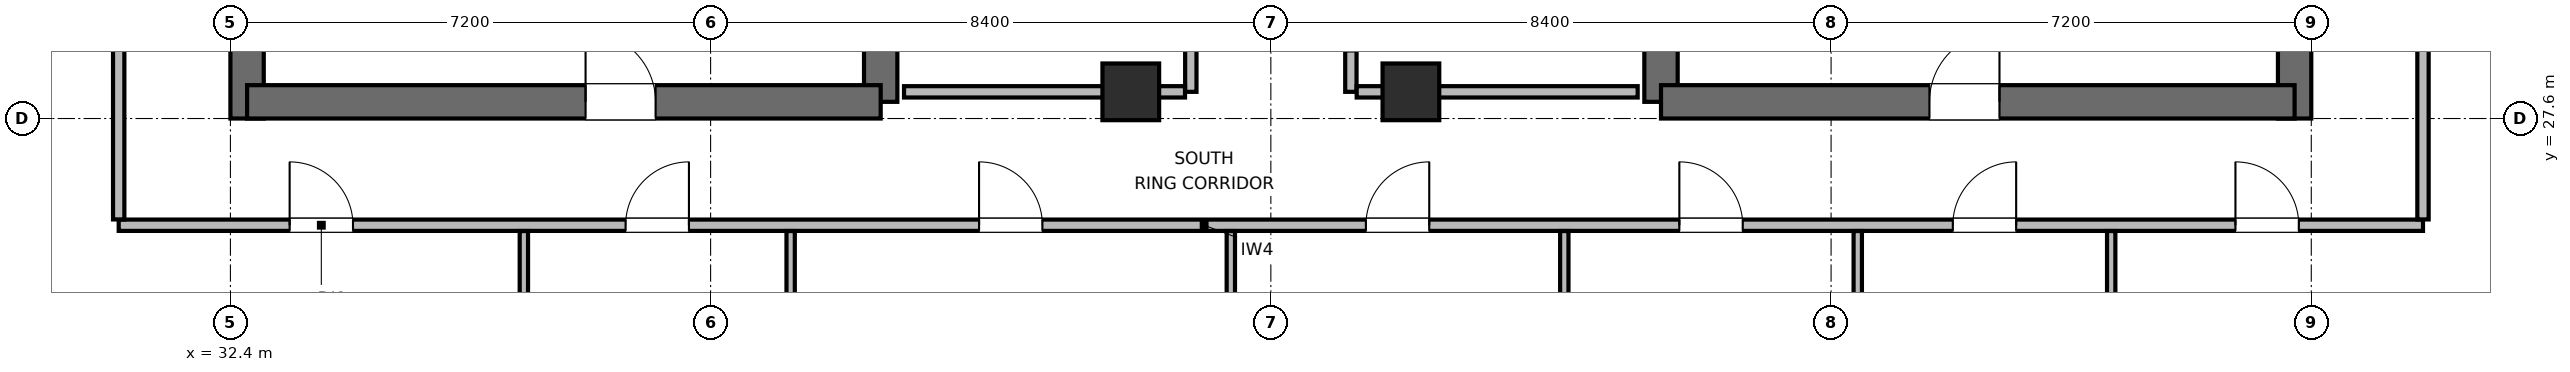
"""IFC4 building model, lengths in metres.
Left out: names, types, materials, properties, quantities, classifications, styles, units other than length and angle.
Written with IfcOpenShell. Run it as: python <this file> out.ifc"""

import sys

from ifc_helpers import new_model, si_unit, direction, frame, frame_2d, origin, origin_2d, place, context, subcontext, project, spatial, rectangle, extrude, element, fill, save


model = new_model("IFC4")
c1 = context("Model", 3, precision=1e-05, world=origin(), true_north=direction((0.0, 1.0)))
c2 = subcontext(c1, "Body", "Model", "MODEL_VIEW")
j1 = project(units=[si_unit("LENGTHUNIT", "METRE"), si_unit("PLANEANGLEUNIT", "RADIAN")], contexts=[c1])
p1 = place(None, origin())
s1 = spatial("IfcSite", under=j1, at=p1, CompositionType="ELEMENT")
p2 = place(p1, origin())
s2 = spatial("IfcBuilding", under=s1, at=p2, CompositionType="ELEMENT")
p3 = place(p2, frame((0.0, 0.0, 314.1)))
s3 = spatial("IfcBuildingStorey", under=s2, at=p3, CompositionType="ELEMENT", Elevation=314.1)
p4 = place(p3, frame((32.65, 27.6, 0.0), z_axis=(0.0, 0.0, 1.0), x_axis=(0.0, 1.0, 0.0)))
e1 = element("IfcWall", 1, at=p4, inside=s3, PredefinedType="SHEAR", context=c2, shape_type="SweptSolid", body=[
    extrude(rectangle(XDim=16.8, YDim=0.5, at=frame_2d((8.4, 0.0))), origin(), (0.0, 0.0, 1.0), 3.9),
])
p5 = place(p3, frame((42.15, 27.85, 0.0), z_axis=(0.0, 0.0, 1.0), x_axis=(0.0, 1.0, 0.0)))
e2 = element("IfcWall", 2, at=p5, inside=s3, PredefinedType="SHEAR", context=c2, shape_type="SweptSolid", body=[
    extrude(rectangle(XDim=6.55, YDim=0.5, at=frame_2d((3.275, 0.0))), origin(), (0.0, 0.0, 1.0), 3.9),
])
p6 = place(p3, frame((32.65, 27.85, 0.0), z_axis=(0.0, 0.0, 1.0), x_axis=(1.0, 0.0, 0.0)))
e3 = element("IfcWall", 3, at=p6, inside=s3, PredefinedType="SHEAR", context=c2, shape_type="SweptSolid", body=[
    extrude(rectangle(XDim=9.5, YDim=0.5, at=frame_2d((4.75, 0.0))), origin(), (0.0, 0.0, 1.0), 3.9),
])
p7 = place(p6, frame((5.075, 0.0, 0.0)))
e4 = element("IfcOpeningElement", 4, at=p7, cuts=e3, PredefinedType="OPENING", context=c2, shape_type="SweptSolid", body=[
    extrude(rectangle(XDim=1.05, YDim=2.04, at=frame_2d((0.525, 1.02))), frame((0.0, 0.26, 0.0), z_axis=(0.0, -1.0, 0.0), x_axis=(1.0, 0.0, 0.0)), (0.0, 0.0, 1.0), 0.52),
])
p8 = place(p3, frame((53.85, 27.85, 0.0), z_axis=(0.0, 0.0, 1.0), x_axis=(0.0, 1.0, 0.0)))
e5 = element("IfcWall", 5, at=p8, inside=s3, PredefinedType="SHEAR", context=c2, shape_type="SweptSolid", body=[
    extrude(rectangle(XDim=7.95, YDim=0.5, at=frame_2d((3.975, 0.0))), origin(), (0.0, 0.0, 1.0), 3.9),
])
p9 = place(p3, frame((63.35, 27.6, 0.0), z_axis=(0.0, 0.0, 1.0), x_axis=(0.0, 1.0, 0.0)))
e6 = element("IfcWall", 6, at=p9, inside=s3, PredefinedType="SHEAR", context=c2, shape_type="SweptSolid", body=[
    extrude(rectangle(XDim=16.8, YDim=0.5, at=frame_2d((8.4, 0.0))), origin(), (0.0, 0.0, 1.0), 3.9),
])
p10 = place(p3, frame((53.85, 27.85, 0.0), z_axis=(0.0, 0.0, 1.0), x_axis=(1.0, 0.0, 0.0)))
e7 = element("IfcWall", 7, at=p10, inside=s3, PredefinedType="SHEAR", context=c2, shape_type="SweptSolid", body=[
    extrude(rectangle(XDim=9.5, YDim=0.5, at=frame_2d((4.75, 0.0))), origin(), (0.0, 0.0, 1.0), 3.9),
])
p11 = place(p10, frame((4.025, 0.0, 0.0)))
e8 = element("IfcOpeningElement", 8, at=p11, cuts=e7, PredefinedType="OPENING", context=c2, shape_type="SweptSolid", body=[
    extrude(rectangle(XDim=1.05, YDim=2.04, at=frame_2d((0.525, 1.02))), frame((0.0, 0.26, 0.0), z_axis=(0.0, -1.0, 0.0), x_axis=(1.0, 0.0, 0.0)), (0.0, 0.0, 1.0), 0.52),
])
for number, where, z_axis, x_axis in (
    (9, (45.9, 28.0, 0.0), (0.0, 0.0, 1.0), (1.0, 0.0, 0.0)),
    (10, (50.1, 28.0, 0.0), (0.0, 0.0, 1.0), (1.0, 0.0, 0.0)),
):
    element("IfcColumn", number, at=place(p3, frame(where, z_axis=z_axis, x_axis=x_axis)), inside=s3, PredefinedType="COLUMN", context=c2, shape_type="SweptSolid", body=[
        extrude(rectangle(XDim=0.85, YDim=0.85, at=origin_2d()), origin(), (0.0, 0.0, 1.0), 3.9),
    ])
p12 = place(p3, frame((46.8, 28.0, 0.0), z_axis=(0.0, 0.0, 1.0), x_axis=(0.0, 1.0, 0.0)))
e11 = element("IfcWall", 11, at=p12, inside=s3, PredefinedType="PARTITIONING", context=c2, shape_type="SweptSolid", body=[
    extrude(rectangle(XDim=4.5, YDim=0.17, at=frame_2d((2.25, 0.0))), origin(), (0.0, 0.0, 1.0), 3.68),
])
p13 = place(p12, frame((1.8, 0.0, 0.0)))
e12 = element("IfcOpeningElement", 12, at=p13, cuts=e11, PredefinedType="OPENING", context=c2, shape_type="SweptSolid", body=[
    extrude(rectangle(XDim=0.9, YDim=2.02, at=frame_2d((0.45, 1.01))), frame((0.0, 0.095, 0.0), z_axis=(0.0, -1.0, 0.0), x_axis=(1.0, 0.0, 0.0)), (0.0, 0.0, 1.0), 0.19),
])
p14 = place(p3, frame((42.5, 28.0, 0.0), z_axis=(0.0, 0.0, 1.0), x_axis=(1.0, 0.0, 0.0)))
e13 = element("IfcWall", 13, at=p14, inside=s3, PredefinedType="PARTITIONING", context=c2, shape_type="SweptSolid", body=[
    extrude(rectangle(XDim=4.213, YDim=0.17, at=frame_2d((2.106, 0.0))), origin(), (0.0, 0.0, 1.0), 2.765),
])
p15 = place(p3, frame((49.2, 28.0, 0.0), z_axis=(0.0, 0.0, 1.0), x_axis=(0.0, 1.0, 0.0)))
e14 = element("IfcWall", 14, at=p15, inside=s3, PredefinedType="PARTITIONING", context=c2, shape_type="SweptSolid", body=[
    extrude(rectangle(XDim=4.5, YDim=0.17, at=frame_2d((2.25, 0.0))), origin(), (0.0, 0.0, 1.0), 3.68),
])
p16 = place(p15, frame((0.605, 0.0, 0.0)))
e15 = element("IfcOpeningElement", 15, at=p16, cuts=e14, PredefinedType="OPENING", context=c2, shape_type="SweptSolid", body=[
    extrude(rectangle(XDim=0.9, YDim=2.02, at=frame_2d((0.45, 1.01))), frame((0.0, 0.095, 0.0), z_axis=(0.0, -1.0, 0.0), x_axis=(1.0, 0.0, 0.0)), (0.0, 0.0, 1.0), 0.19),
])
p17 = place(p15, frame((2.655, 0.0, 0.0)))
e16 = element("IfcOpeningElement", 16, at=p17, cuts=e14, PredefinedType="OPENING", context=c2, shape_type="SweptSolid", body=[
    extrude(rectangle(XDim=0.9, YDim=2.02, at=frame_2d((0.45, 1.01))), frame((0.0, 0.095, 0.0), z_axis=(0.0, -1.0, 0.0), x_axis=(1.0, 0.0, 0.0)), (0.0, 0.0, 1.0), 0.19),
])
p18 = place(p3, frame((49.287, 28.0, 0.0), z_axis=(0.0, 0.0, 1.0), x_axis=(1.0, 0.0, 0.0)))
e17 = element("IfcWall", 17, at=p18, inside=s3, PredefinedType="PARTITIONING", context=c2, shape_type="SweptSolid", body=[
    extrude(rectangle(XDim=4.213, YDim=0.17, at=frame_2d((2.106, 0.0))), origin(), (0.0, 0.0, 1.0), 2.765),
])
p19 = place(p3, frame((30.725, 26.0, 0.0), z_axis=(0.0, 0.0, 1.0), x_axis=(1.0, 0.0, 0.0)))
e18 = element("IfcWall", 18, at=p19, inside=s3, PredefinedType="PARTITIONING", context=c2, shape_type="SweptSolid", body=[
    extrude(rectangle(XDim=34.55, YDim=0.17, at=frame_2d((17.275, 0.0))), origin(), (0.0, 0.0, 1.0), 3.68),
])
p20 = place(p19, frame((2.563, 0.0, 0.0)))
e19 = element("IfcOpeningElement", 19, at=p20, cuts=e18, PredefinedType="OPENING", context=c2, shape_type="SweptSolid", body=[
    extrude(rectangle(XDim=0.95, YDim=2.04, at=frame_2d((0.475, 1.02))), frame((0.0, 0.095, 0.0), z_axis=(0.0, -1.0, 0.0), x_axis=(1.0, 0.0, 0.0)), (0.0, 0.0, 1.0), 0.19),
])
p21 = place(p19, frame((7.6, 0.0, 0.0)))
e20 = element("IfcOpeningElement", 20, at=p21, cuts=e18, PredefinedType="OPENING", context=c2, shape_type="SweptSolid", body=[
    extrude(rectangle(XDim=0.95, YDim=2.04, at=frame_2d((0.475, 1.02))), frame((0.0, 0.095, 0.0), z_axis=(0.0, -1.0, 0.0), x_axis=(1.0, 0.0, 0.0)), (0.0, 0.0, 1.0), 0.19),
])
p22 = place(p19, frame((12.9, 0.0, 0.0)))
e21 = element("IfcOpeningElement", 21, at=p22, cuts=e18, PredefinedType="OPENING", context=c2, shape_type="SweptSolid", body=[
    extrude(rectangle(XDim=0.95, YDim=2.04, at=frame_2d((0.475, 1.02))), frame((0.0, 0.095, 0.0), z_axis=(0.0, -1.0, 0.0), x_axis=(1.0, 0.0, 0.0)), (0.0, 0.0, 1.0), 0.19),
])
p23 = place(p19, frame((18.7, 0.0, 0.0)))
e22 = element("IfcOpeningElement", 22, at=p23, cuts=e18, PredefinedType="OPENING", context=c2, shape_type="SweptSolid", body=[
    extrude(rectangle(XDim=0.95, YDim=2.04, at=frame_2d((0.475, 1.02))), frame((0.0, 0.095, 0.0), z_axis=(0.0, -1.0, 0.0), x_axis=(1.0, 0.0, 0.0)), (0.0, 0.0, 1.0), 0.19),
])
p24 = place(p19, frame((23.4, 0.0, 0.0)))
e23 = element("IfcOpeningElement", 23, at=p24, cuts=e18, PredefinedType="OPENING", context=c2, shape_type="SweptSolid", body=[
    extrude(rectangle(XDim=0.95, YDim=2.04, at=frame_2d((0.475, 1.02))), frame((0.0, 0.095, 0.0), z_axis=(0.0, -1.0, 0.0), x_axis=(1.0, 0.0, 0.0)), (0.0, 0.0, 1.0), 0.19),
])
p25 = place(p19, frame((27.5, 0.0, 0.0)))
e24 = element("IfcOpeningElement", 24, at=p25, cuts=e18, PredefinedType="OPENING", context=c2, shape_type="SweptSolid", body=[
    extrude(rectangle(XDim=0.95, YDim=2.04, at=frame_2d((0.475, 1.02))), frame((0.0, 0.095, 0.0), z_axis=(0.0, -1.0, 0.0), x_axis=(1.0, 0.0, 0.0)), (0.0, 0.0, 1.0), 0.19),
])
p26 = place(p19, frame((31.738, 0.0, 0.0)))
e25 = element("IfcOpeningElement", 25, at=p26, cuts=e18, PredefinedType="OPENING", context=c2, shape_type="SweptSolid", body=[
    extrude(rectangle(XDim=0.95, YDim=2.04, at=frame_2d((0.475, 1.02))), frame((0.0, 0.095, 0.0), z_axis=(0.0, -1.0, 0.0), x_axis=(1.0, 0.0, 0.0)), (0.0, 0.0, 1.0), 0.19),
])
p27 = place(p3, frame((30.725, 26.087, 0.0), z_axis=(0.0, 0.0, 1.0), x_axis=(0.0, 1.0, 0.0)))
e26 = element("IfcWall", 26, at=p27, inside=s3, PredefinedType="PARTITIONING", context=c2, shape_type="SweptSolid", body=[
    extrude(rectangle(XDim=19.826, YDim=0.17, at=frame_2d((9.913, 0.0))), origin(), (0.0, 0.0, 1.0), 3.68),
])
p28 = place(p27, frame((9.438, 0.0, 0.0)))
e27 = element("IfcOpeningElement", 27, at=p28, cuts=e26, PredefinedType="OPENING", context=c2, shape_type="SweptSolid", body=[
    extrude(rectangle(XDim=0.95, YDim=2.04, at=frame_2d((0.475, 1.02))), frame((0.0, 0.095, 0.0), z_axis=(0.0, -1.0, 0.0), x_axis=(1.0, 0.0, 0.0)), (0.0, 0.0, 1.0), 0.19),
])
p29 = place(p3, frame((65.275, 26.087, 0.0), z_axis=(0.0, 0.0, 1.0), x_axis=(0.0, 1.0, 0.0)))
e28 = element("IfcWall", 28, at=p29, inside=s3, PredefinedType="PARTITIONING", context=c2, shape_type="SweptSolid", body=[
    extrude(rectangle(XDim=19.826, YDim=0.17, at=frame_2d((9.913, 0.0))), origin(), (0.0, 0.0, 1.0), 3.68),
])
p30 = place(p29, frame((3.938, 0.0, 0.0)))
e29 = element("IfcOpeningElement", 29, at=p30, cuts=e28, PredefinedType="OPENING", context=c2, shape_type="SweptSolid", body=[
    extrude(rectangle(XDim=0.95, YDim=2.04, at=frame_2d((0.475, 1.02))), frame((0.0, 0.095, 0.0), z_axis=(0.0, -1.0, 0.0), x_axis=(1.0, 0.0, 0.0)), (0.0, 0.0, 1.0), 0.19),
])
p31 = place(p29, frame((13.938, 0.0, 0.0)))
e30 = element("IfcOpeningElement", 30, at=p31, cuts=e28, PredefinedType="OPENING", context=c2, shape_type="SweptSolid", body=[
    extrude(rectangle(XDim=0.95, YDim=2.04, at=frame_2d((0.475, 1.02))), frame((0.0, 0.095, 0.0), z_axis=(0.0, -1.0, 0.0), x_axis=(1.0, 0.0, 0.0)), (0.0, 0.0, 1.0), 0.19),
])
p32 = place(p3, frame((36.8, 18.875, 0.0), z_axis=(0.0, 0.0, 1.0), x_axis=(0.0, 1.0, 0.0)))
e31 = element("IfcWall", 31, at=p32, inside=s3, PredefinedType="PARTITIONING", context=c2, shape_type="SweptSolid", body=[
    extrude(rectangle(XDim=7.038, YDim=0.125, at=frame_2d((3.519, 0.0))), origin(), (0.0, 0.0, 1.0), 3.68),
])
p33 = place(p3, frame((40.8, 18.875, 0.0), z_axis=(0.0, 0.0, 1.0), x_axis=(0.0, 1.0, 0.0)))
e32 = element("IfcWall", 32, at=p33, inside=s3, PredefinedType="PARTITIONING", context=c2, shape_type="SweptSolid", body=[
    extrude(rectangle(XDim=7.038, YDim=0.125, at=frame_2d((3.519, 0.0))), origin(), (0.0, 0.0, 1.0), 3.043),
])
p34 = place(p3, frame((47.4, 22.04, 0.0), z_axis=(0.0, 0.0, 1.0), x_axis=(0.0, 1.0, 0.0)))
e33 = element("IfcWall", 33, at=p34, inside=s3, PredefinedType="PARTITIONING", context=c2, shape_type="SweptSolid", body=[
    extrude(rectangle(XDim=3.873, YDim=0.125, at=frame_2d((1.937, 0.0))), origin(), (0.0, 0.0, 1.0), 3.68),
])
p35 = place(p3, frame((52.4, 19.921, 0.0), z_axis=(0.0, 0.0, 1.0), x_axis=(0.0, 1.0, 0.0)))
e34 = element("IfcWall", 34, at=p35, inside=s3, PredefinedType="PARTITIONING", context=c2, shape_type="SweptSolid", body=[
    extrude(rectangle(XDim=5.992, YDim=0.125, at=frame_2d((2.996, 0.0))), origin(), (0.0, 0.0, 1.0), 3.043),
])
for number, where, z_axis, x_axis in (
    (35, (56.8, 18.875, 0.0), (0.0, 0.0, 1.0), (0.0, 1.0, 0.0)),
    (36, (60.6, 18.875, 0.0), (0.0, 0.0, 1.0), (0.0, 1.0, 0.0)),
):
    element("IfcWall", number, at=place(p3, frame(where, z_axis=z_axis, x_axis=x_axis)), inside=s3, PredefinedType="PARTITIONING", context=c2, shape_type="SweptSolid", body=[
        extrude(rectangle(XDim=7.038, YDim=0.125, at=frame_2d((3.519, 0.0))), origin(), (0.0, 0.0, 1.0), 3.68),
    ])
p36 = place(p7, origin())
e37 = element("IfcDoor", 37, at=p36, inside=s3, OperationType="SINGLE_SWING_LEFT", PredefinedType="DOOR", context=c2, shape_type="SweptSolid", body=[
    extrude(rectangle(XDim=1.05, YDim=2.04, at=frame_2d((0.525, 1.02))), frame((0.0, 0.025, 0.0), z_axis=(0.0, -1.0, 0.0), x_axis=(1.0, 0.0, 0.0)), (0.0, 0.0, 1.0), 0.05),
])
fill(e4, e37)
p37 = place(p11, origin())
e38 = element("IfcDoor", 38, at=p37, inside=s3, OperationType="SINGLE_SWING_RIGHT", PredefinedType="DOOR", context=c2, shape_type="SweptSolid", body=[
    extrude(rectangle(XDim=1.05, YDim=2.04, at=frame_2d((0.525, 1.02))), frame((0.0, 0.025, 0.0), z_axis=(0.0, -1.0, 0.0), x_axis=(1.0, 0.0, 0.0)), (0.0, 0.0, 1.0), 0.05),
])
fill(e8, e38)
p38 = place(p20, origin())
e39 = element("IfcDoor", 39, at=p38, inside=s3, OperationType="SINGLE_SWING_LEFT", PredefinedType="DOOR", context=c2, shape_type="SweptSolid", body=[
    extrude(rectangle(XDim=0.95, YDim=2.04, at=frame_2d((0.475, 1.02))), frame((0.0, 0.025, 0.0), z_axis=(0.0, -1.0, 0.0), x_axis=(1.0, 0.0, 0.0)), (0.0, 0.0, 1.0), 0.05),
])
fill(e19, e39)
p39 = place(p21, origin())
e40 = element("IfcDoor", 40, at=p39, inside=s3, OperationType="SINGLE_SWING_RIGHT", PredefinedType="DOOR", context=c2, shape_type="SweptSolid", body=[
    extrude(rectangle(XDim=0.95, YDim=2.04, at=frame_2d((0.475, 1.02))), frame((0.0, 0.025, 0.0), z_axis=(0.0, -1.0, 0.0), x_axis=(1.0, 0.0, 0.0)), (0.0, 0.0, 1.0), 0.05),
])
fill(e20, e40)
p40 = place(p22, origin())
e41 = element("IfcDoor", 41, at=p40, inside=s3, OperationType="SINGLE_SWING_LEFT", PredefinedType="DOOR", context=c2, shape_type="SweptSolid", body=[
    extrude(rectangle(XDim=0.95, YDim=2.04, at=frame_2d((0.475, 1.02))), frame((0.0, 0.025, 0.0), z_axis=(0.0, -1.0, 0.0), x_axis=(1.0, 0.0, 0.0)), (0.0, 0.0, 1.0), 0.05),
])
fill(e21, e41)
p41 = place(p23, origin())
e42 = element("IfcDoor", 42, at=p41, inside=s3, OperationType="SINGLE_SWING_RIGHT", PredefinedType="DOOR", context=c2, shape_type="SweptSolid", body=[
    extrude(rectangle(XDim=0.95, YDim=2.04, at=frame_2d((0.475, 1.02))), frame((0.0, 0.025, 0.0), z_axis=(0.0, -1.0, 0.0), x_axis=(1.0, 0.0, 0.0)), (0.0, 0.0, 1.0), 0.05),
])
fill(e22, e42)
p42 = place(p24, origin())
e43 = element("IfcDoor", 43, at=p42, inside=s3, OperationType="SINGLE_SWING_LEFT", PredefinedType="DOOR", context=c2, shape_type="SweptSolid", body=[
    extrude(rectangle(XDim=0.95, YDim=2.04, at=frame_2d((0.475, 1.02))), frame((0.0, 0.025, 0.0), z_axis=(0.0, -1.0, 0.0), x_axis=(1.0, 0.0, 0.0)), (0.0, 0.0, 1.0), 0.05),
])
fill(e23, e43)
p43 = place(p25, origin())
e44 = element("IfcDoor", 44, at=p43, inside=s3, OperationType="SINGLE_SWING_RIGHT", PredefinedType="DOOR", context=c2, shape_type="SweptSolid", body=[
    extrude(rectangle(XDim=0.95, YDim=2.04, at=frame_2d((0.475, 1.02))), frame((0.0, 0.025, 0.0), z_axis=(0.0, -1.0, 0.0), x_axis=(1.0, 0.0, 0.0)), (0.0, 0.0, 1.0), 0.05),
])
fill(e24, e44)
p44 = place(p26, origin())
e45 = element("IfcDoor", 45, at=p44, inside=s3, OperationType="SINGLE_SWING_LEFT", PredefinedType="DOOR", context=c2, shape_type="SweptSolid", body=[
    extrude(rectangle(XDim=0.95, YDim=2.04, at=frame_2d((0.475, 1.02))), frame((0.0, 0.025, 0.0), z_axis=(0.0, -1.0, 0.0), x_axis=(1.0, 0.0, 0.0)), (0.0, 0.0, 1.0), 0.05),
])
fill(e25, e45)
save(model, sys.argv[1])
